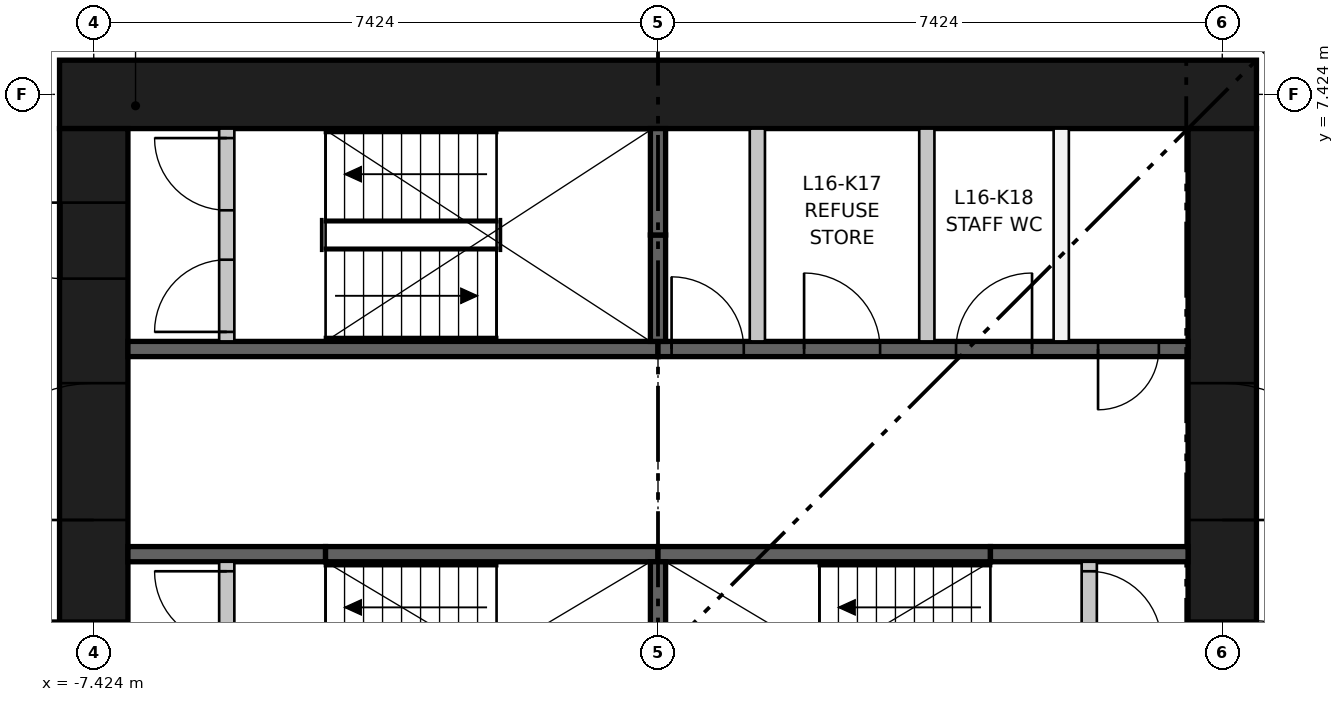
"""IFC4 building model, lengths in metres.
Left out: names, types, materials, properties, quantities, classifications, styles, units other than length and angle.
Written with IfcOpenShell. Run it as: python <this file> out.ifc"""

import sys

from ifc_helpers import new_model, si_unit, direction, frame, frame_2d, origin, place, context, subcontext, project, spatial, rectangle, extrude, element, fill, save


model = new_model("IFC4")
c1 = context("Model", 3, precision=1e-05, world=origin(), true_north=direction((0.0, 1.0)))
c2 = subcontext(c1, "Body", "Model", "MODEL_VIEW")
j1 = project(units=[si_unit("LENGTHUNIT", "METRE"), si_unit("PLANEANGLEUNIT", "RADIAN")], contexts=[c1])
p1 = place(None, origin())
s1 = spatial("IfcSite", under=j1, at=p1, CompositionType="ELEMENT")
p2 = place(p1, origin())
s2 = spatial("IfcBuilding", under=s1, at=p2, CompositionType="ELEMENT")
p3 = place(p2, frame((0.0, 0.0, 62.7)))
s3 = spatial("IfcBuildingStorey", under=s2, at=p3, CompositionType="ELEMENT", Elevation=62.7)
p4 = place(p3, frame((-7.874, 7.424, 0.0), z_axis=(0.0, 0.0, 1.0), x_axis=(1.0, 0.0, 0.0)))
e1 = element("IfcWall", 1, at=p4, inside=s3, PredefinedType="SHEAR", context=c2, shape_type="SweptSolid", body=[
    extrude(rectangle(XDim=15.748, YDim=0.9, at=frame_2d((7.874, 0.0))), origin(), (0.0, 0.0, 1.0), 3.65),
])
p5 = place(p3, frame((-7.424, -6.974, 0.0), z_axis=(0.0, 0.0, 1.0), x_axis=(0.0, 1.0, 0.0)))
e2 = element("IfcWall", 2, at=p5, inside=s3, PredefinedType="SHEAR", context=c2, shape_type="SweptSolid", body=[
    extrude(rectangle(XDim=13.948, YDim=0.9, at=frame_2d((6.974, 0.0))), origin(), (0.0, 0.0, 1.0), 3.65),
])
p6 = place(p5, frame((6.474, 0.0, 0.0)))
e3 = element("IfcOpeningElement", 3, at=p6, cuts=e2, PredefinedType="OPENING", context=c2, shape_type="SweptSolid", body=[
    extrude(rectangle(XDim=1.0, YDim=2.1, at=frame_2d((0.5, 1.05))), frame((0.0, 0.46, 0.0), z_axis=(0.0, -1.0, 0.0), x_axis=(1.0, 0.0, 0.0)), (0.0, 0.0, 1.0), 0.92),
])
p7 = place(p5, frame((3.35, 0.0, 0.0)))
e4 = element("IfcOpeningElement", 4, at=p7, cuts=e2, PredefinedType="OPENING", context=c2, shape_type="SweptSolid", body=[
    extrude(rectangle(XDim=1.8, YDim=2.1, at=frame_2d((0.9, 1.05))), frame((0.0, 0.46, 0.0), z_axis=(0.0, -1.0, 0.0), x_axis=(1.0, 0.0, 0.0)), (0.0, 0.0, 1.0), 0.92),
])
p8 = place(p5, frame((8.799, 0.0, 0.0)))
e5 = element("IfcOpeningElement", 5, at=p8, cuts=e2, PredefinedType="OPENING", context=c2, shape_type="SweptSolid", body=[
    extrude(rectangle(XDim=1.8, YDim=2.1, at=frame_2d((0.9, 1.05))), frame((0.0, 0.46, 0.0), z_axis=(0.0, -1.0, 0.0), x_axis=(1.0, 0.0, 0.0)), (0.0, 0.0, 1.0), 0.92),
])
p9 = place(p5, frame((11.974, 0.0, 0.0)))
e6 = element("IfcOpeningElement", 6, at=p9, cuts=e2, PredefinedType="OPENING", context=c2, shape_type="SweptSolid", body=[
    extrude(rectangle(XDim=1.0, YDim=2.1, at=frame_2d((0.5, 1.05))), frame((0.0, 0.46, 0.0), z_axis=(0.0, -1.0, 0.0), x_axis=(1.0, 0.0, 0.0)), (0.0, 0.0, 1.0), 0.92),
])
p10 = place(p3, frame((7.424, -6.974, 0.0), z_axis=(0.0, 0.0, 1.0), x_axis=(0.0, 1.0, 0.0)))
e7 = element("IfcWall", 7, at=p10, inside=s3, PredefinedType="SHEAR", context=c2, shape_type="SweptSolid", body=[
    extrude(rectangle(XDim=13.948, YDim=0.9, at=frame_2d((6.974, 0.0))), origin(), (0.0, 0.0, 1.0), 3.65),
])
p11 = place(p10, frame((6.474, 0.0, 0.0)))
e8 = element("IfcOpeningElement", 8, at=p11, cuts=e7, PredefinedType="OPENING", context=c2, shape_type="SweptSolid", body=[
    extrude(rectangle(XDim=1.0, YDim=2.1, at=frame_2d((0.5, 1.05))), frame((0.0, 0.46, 0.0), z_axis=(0.0, -1.0, 0.0), x_axis=(1.0, 0.0, 0.0)), (0.0, 0.0, 1.0), 0.92),
])
p12 = place(p10, frame((3.35, 0.0, 0.0)))
e9 = element("IfcOpeningElement", 9, at=p12, cuts=e7, PredefinedType="OPENING", context=c2, shape_type="SweptSolid", body=[
    extrude(rectangle(XDim=1.8, YDim=2.1, at=frame_2d((0.9, 1.05))), frame((0.0, 0.46, 0.0), z_axis=(0.0, -1.0, 0.0), x_axis=(1.0, 0.0, 0.0)), (0.0, 0.0, 1.0), 0.92),
])
p13 = place(p10, frame((8.799, 0.0, 0.0)))
e10 = element("IfcOpeningElement", 10, at=p13, cuts=e7, PredefinedType="OPENING", context=c2, shape_type="SweptSolid", body=[
    extrude(rectangle(XDim=1.8, YDim=2.1, at=frame_2d((0.9, 1.05))), frame((0.0, 0.46, 0.0), z_axis=(0.0, -1.0, 0.0), x_axis=(1.0, 0.0, 0.0)), (0.0, 0.0, 1.0), 0.92),
])
p14 = place(p3, frame((-6.974, 4.074, 0.0), z_axis=(0.0, 0.0, 1.0), x_axis=(1.0, 0.0, 0.0)))
e11 = element("IfcWall", 11, at=p14, inside=s3, PredefinedType="SHEAR", context=c2, shape_type="SweptSolid", body=[
    extrude(rectangle(XDim=6.974, YDim=0.2, at=frame_2d((3.487, 0.0))), origin(), (0.0, 0.0, 1.0), 3.3),
])
p15 = place(p3, frame((0.0, 4.074, 0.0), z_axis=(0.0, 0.0, 1.0), x_axis=(1.0, 0.0, 0.0)))
e12 = element("IfcWall", 12, at=p15, inside=s3, PredefinedType="SHEAR", context=c2, shape_type="SweptSolid", body=[
    extrude(rectangle(XDim=6.974, YDim=0.2, at=frame_2d((3.487, 0.0))), origin(), (0.0, 0.0, 1.0), 3.3),
])
p16 = place(p15, frame((0.179, 0.0, 0.0)))
e13 = element("IfcOpeningElement", 13, at=p16, cuts=e12, PredefinedType="OPENING", context=c2, shape_type="SweptSolid", body=[
    extrude(rectangle(XDim=0.95, YDim=2.1, at=frame_2d((0.475, 1.05))), frame((0.0, 0.11, 0.0), z_axis=(0.0, -1.0, 0.0), x_axis=(1.0, 0.0, 0.0)), (0.0, 0.0, 1.0), 0.22),
])
p17 = place(p15, frame((1.922, 0.0, 0.0)))
e14 = element("IfcOpeningElement", 14, at=p17, cuts=e12, PredefinedType="OPENING", context=c2, shape_type="SweptSolid", body=[
    extrude(rectangle(XDim=1.0, YDim=2.1, at=frame_2d((0.5, 1.05))), frame((0.0, 0.11, 0.0), z_axis=(0.0, -1.0, 0.0), x_axis=(1.0, 0.0, 0.0)), (0.0, 0.0, 1.0), 0.22),
])
p18 = place(p15, frame((3.921, 0.0, 0.0)))
e15 = element("IfcOpeningElement", 15, at=p18, cuts=e12, PredefinedType="OPENING", context=c2, shape_type="SweptSolid", body=[
    extrude(rectangle(XDim=1.0, YDim=2.1, at=frame_2d((0.5, 1.05))), frame((0.0, 0.11, 0.0), z_axis=(0.0, -1.0, 0.0), x_axis=(1.0, 0.0, 0.0)), (0.0, 0.0, 1.0), 0.22),
])
p19 = place(p15, frame((5.79, 0.0, 0.0)))
e16 = element("IfcOpeningElement", 16, at=p19, cuts=e12, PredefinedType="OPENING", context=c2, shape_type="SweptSolid", body=[
    extrude(rectangle(XDim=0.8, YDim=2.1, at=frame_2d((0.4, 1.05))), frame((0.0, 0.11, 0.0), z_axis=(0.0, -1.0, 0.0), x_axis=(1.0, 0.0, 0.0)), (0.0, 0.0, 1.0), 0.22),
])
p20 = place(p3, frame((-6.974, 1.375, 0.0), z_axis=(0.0, 0.0, 1.0), x_axis=(1.0, 0.0, 0.0)))
e17 = element("IfcWall", 17, at=p20, inside=s3, PredefinedType="SHEAR", context=c2, shape_type="SweptSolid", body=[
    extrude(rectangle(XDim=2.6, YDim=0.2, at=frame_2d((1.3, 0.0))), origin(), (0.0, 0.0, 1.0), 3.3),
])
for number, where, z_axis, x_axis in (
    (18, (-4.374, 1.375, 0.0), (0.0, 0.0, 1.0), (1.0, 0.0, 0.0)),
    (19, (0.0, 1.375, 0.0), (0.0, 0.0, 1.0), (1.0, 0.0, 0.0)),
):
    element("IfcWall", number, at=place(p3, frame(where, z_axis=z_axis, x_axis=x_axis)), inside=s3, PredefinedType="SHEAR", context=c2, shape_type="SweptSolid", body=[
        extrude(rectangle(XDim=4.374, YDim=0.2, at=frame_2d((2.187, 0.0))), origin(), (0.0, 0.0, 1.0), 3.3),
    ])
p21 = place(p3, frame((4.374, 1.375, 0.0), z_axis=(0.0, 0.0, 1.0), x_axis=(1.0, 0.0, 0.0)))
e20 = element("IfcWall", 20, at=p21, inside=s3, PredefinedType="SHEAR", context=c2, shape_type="SweptSolid", body=[
    extrude(rectangle(XDim=2.6, YDim=0.2, at=frame_2d((1.3, 0.0))), origin(), (0.0, 0.0, 1.0), 3.3),
])
p22 = place(p3, frame((0.0, -1.275, 0.0), z_axis=(0.0, 0.0, 1.0), x_axis=(0.0, 1.0, 0.0)))
e21 = element("IfcWall", 21, at=p22, inside=s3, PredefinedType="SHEAR", context=c2, shape_type="SweptSolid", body=[
    extrude(rectangle(XDim=2.55, YDim=0.2, at=frame_2d((1.275, 0.0))), origin(), (0.0, 0.0, 1.0), 3.3),
])
p23 = place(p3, frame((0.0, 4.174, 0.0), z_axis=(0.0, 0.0, 1.0), x_axis=(0.0, 1.0, 0.0)))
e22 = element("IfcWall", 22, at=p23, inside=s3, PredefinedType="SHEAR", context=c2, shape_type="SweptSolid", body=[
    extrude(rectangle(XDim=1.4, YDim=0.2, at=frame_2d((0.7, 0.0))), origin(), (0.0, 0.0, 1.0), 3.3),
])
p24 = place(p3, frame((0.0, 5.574, 0.0), z_axis=(0.0, 0.0, 1.0), x_axis=(0.0, 1.0, 0.0)))
e23 = element("IfcWall", 23, at=p24, inside=s3, PredefinedType="SHEAR", context=c2, shape_type="SweptSolid", body=[
    extrude(rectangle(XDim=1.4, YDim=0.2, at=frame_2d((0.7, 0.0))), origin(), (0.0, 0.0, 1.0), 3.3),
])
for number, where, z_axis, x_axis in (
    (24, (1.307, 4.174, 0.0), (0.0, 0.0, 1.0), (0.0, 1.0, 0.0)),
    (25, (3.537, 4.174, 0.0), (0.0, 0.0, 1.0), (0.0, 1.0, 0.0)),
    (26, (5.305, 4.174, 0.0), (0.0, 0.0, 1.0), (0.0, 1.0, 0.0)),
):
    element("IfcWall", number, at=place(p3, frame(where, z_axis=z_axis, x_axis=x_axis)), inside=s3, PredefinedType="PARTITIONING", context=c2, shape_type="SweptSolid", body=[
        extrude(rectangle(XDim=2.8, YDim=0.2, at=frame_2d((1.4, 0.0))), origin(), (0.0, 0.0, 1.0), 3.3),
    ])
p25 = place(p3, frame((-5.674, -1.275, 0.0), z_axis=(0.0, 0.0, 1.0), x_axis=(0.0, 1.0, 0.0)))
e27 = element("IfcWall", 27, at=p25, inside=s3, PredefinedType="PARTITIONING", context=c2, shape_type="SweptSolid", body=[
    extrude(rectangle(XDim=2.55, YDim=0.2, at=frame_2d((1.275, 0.0))), origin(), (0.0, 0.0, 1.0), 3.3),
])
p26 = place(p25, frame((0.125, 0.0, 0.0)))
e28 = element("IfcOpeningElement", 28, at=p26, cuts=e27, PredefinedType="OPENING", context=c2, shape_type="SweptSolid", body=[
    extrude(rectangle(XDim=0.95, YDim=2.1, at=frame_2d((0.475, 1.05))), frame((0.0, 0.11, 0.0), z_axis=(0.0, -1.0, 0.0), x_axis=(1.0, 0.0, 0.0)), (0.0, 0.0, 1.0), 0.22),
])
p27 = place(p25, frame((1.475, 0.0, 0.0)))
e29 = element("IfcOpeningElement", 29, at=p27, cuts=e27, PredefinedType="OPENING", context=c2, shape_type="SweptSolid", body=[
    extrude(rectangle(XDim=0.95, YDim=2.1, at=frame_2d((0.475, 1.05))), frame((0.0, 0.11, 0.0), z_axis=(0.0, -1.0, 0.0), x_axis=(1.0, 0.0, 0.0)), (0.0, 0.0, 1.0), 0.22),
])
p28 = place(p3, frame((5.674, -1.275, 0.0), z_axis=(0.0, 0.0, 1.0), x_axis=(0.0, 1.0, 0.0)))
e30 = element("IfcWall", 30, at=p28, inside=s3, PredefinedType="PARTITIONING", context=c2, shape_type="SweptSolid", body=[
    extrude(rectangle(XDim=2.55, YDim=0.2, at=frame_2d((1.275, 0.0))), origin(), (0.0, 0.0, 1.0), 3.3),
])
p29 = place(p28, frame((0.125, 0.0, 0.0)))
e31 = element("IfcOpeningElement", 31, at=p29, cuts=e30, PredefinedType="OPENING", context=c2, shape_type="SweptSolid", body=[
    extrude(rectangle(XDim=0.95, YDim=2.1, at=frame_2d((0.475, 1.05))), frame((0.0, 0.11, 0.0), z_axis=(0.0, -1.0, 0.0), x_axis=(1.0, 0.0, 0.0)), (0.0, 0.0, 1.0), 0.22),
])
p30 = place(p28, frame((1.475, 0.0, 0.0)))
e32 = element("IfcOpeningElement", 32, at=p30, cuts=e30, PredefinedType="OPENING", context=c2, shape_type="SweptSolid", body=[
    extrude(rectangle(XDim=0.95, YDim=2.1, at=frame_2d((0.475, 1.05))), frame((0.0, 0.11, 0.0), z_axis=(0.0, -1.0, 0.0), x_axis=(1.0, 0.0, 0.0)), (0.0, 0.0, 1.0), 0.22),
])
p31 = place(p3, frame((-5.674, 4.174, 0.0), z_axis=(0.0, 0.0, 1.0), x_axis=(0.0, 1.0, 0.0)))
e33 = element("IfcWall", 33, at=p31, inside=s3, PredefinedType="PARTITIONING", context=c2, shape_type="SweptSolid", body=[
    extrude(rectangle(XDim=2.8, YDim=0.2, at=frame_2d((1.4, 0.0))), origin(), (0.0, 0.0, 1.0), 3.3),
])
p32 = place(p31, frame((0.125, 0.0, 0.0)))
e34 = element("IfcOpeningElement", 34, at=p32, cuts=e33, PredefinedType="OPENING", context=c2, shape_type="SweptSolid", body=[
    extrude(rectangle(XDim=0.95, YDim=2.1, at=frame_2d((0.475, 1.05))), frame((0.0, 0.11, 0.0), z_axis=(0.0, -1.0, 0.0), x_axis=(1.0, 0.0, 0.0)), (0.0, 0.0, 1.0), 0.22),
])
p33 = place(p31, frame((1.725, 0.0, 0.0)))
e35 = element("IfcOpeningElement", 35, at=p33, cuts=e33, PredefinedType="OPENING", context=c2, shape_type="SweptSolid", body=[
    extrude(rectangle(XDim=0.95, YDim=2.1, at=frame_2d((0.475, 1.05))), frame((0.0, 0.11, 0.0), z_axis=(0.0, -1.0, 0.0), x_axis=(1.0, 0.0, 0.0)), (0.0, 0.0, 1.0), 0.22),
])
p34 = place(p27, origin())
e36 = element("IfcDoor", 36, at=p34, inside=s3, OperationType="SINGLE_SWING_RIGHT", PredefinedType="DOOR", context=c2, shape_type="SweptSolid", body=[
    extrude(rectangle(XDim=0.95, YDim=2.1, at=frame_2d((0.475, 1.05))), frame((0.0, 0.025, 0.0), z_axis=(0.0, -1.0, 0.0), x_axis=(1.0, 0.0, 0.0)), (0.0, 0.0, 1.0), 0.05),
])
fill(e29, e36)
p35 = place(p30, frame((0.95, 0.0, 0.0), z_axis=(0.0, 0.0, 1.0), x_axis=(-1.0, 0.0, 0.0)))
e37 = element("IfcDoor", 37, at=p35, inside=s3, OperationType="SINGLE_SWING_LEFT", PredefinedType="DOOR", context=c2, shape_type="SweptSolid", body=[
    extrude(rectangle(XDim=0.95, YDim=2.1, at=frame_2d((0.475, 1.05))), frame((0.0, 0.025, 0.0), z_axis=(0.0, -1.0, 0.0), x_axis=(1.0, 0.0, 0.0)), (0.0, 0.0, 1.0), 0.05),
])
fill(e32, e37)
p36 = place(p32, origin())
e38 = element("IfcDoor", 38, at=p36, inside=s3, OperationType="SINGLE_SWING_LEFT", PredefinedType="DOOR", context=c2, shape_type="SweptSolid", body=[
    extrude(rectangle(XDim=0.95, YDim=2.1, at=frame_2d((0.475, 1.05))), frame((0.0, 0.025, 0.0), z_axis=(0.0, -1.0, 0.0), x_axis=(1.0, 0.0, 0.0)), (0.0, 0.0, 1.0), 0.05),
])
fill(e34, e38)
p37 = place(p33, origin())
e39 = element("IfcDoor", 39, at=p37, inside=s3, OperationType="SINGLE_SWING_RIGHT", PredefinedType="DOOR", context=c2, shape_type="SweptSolid", body=[
    extrude(rectangle(XDim=0.95, YDim=2.1, at=frame_2d((0.475, 1.05))), frame((0.0, 0.025, 0.0), z_axis=(0.0, -1.0, 0.0), x_axis=(1.0, 0.0, 0.0)), (0.0, 0.0, 1.0), 0.05),
])
fill(e35, e39)
p38 = place(p16, origin())
e40 = element("IfcDoor", 40, at=p38, inside=s3, OperationType="SINGLE_SWING_LEFT", PredefinedType="DOOR", context=c2, shape_type="SweptSolid", body=[
    extrude(rectangle(XDim=0.95, YDim=2.1, at=frame_2d((0.475, 1.05))), frame((0.0, 0.025, 0.0), z_axis=(0.0, -1.0, 0.0), x_axis=(1.0, 0.0, 0.0)), (0.0, 0.0, 1.0), 0.05),
])
fill(e13, e40)
p39 = place(p17, origin())
e41 = element("IfcDoor", 41, at=p39, inside=s3, OperationType="SINGLE_SWING_LEFT", PredefinedType="DOOR", context=c2, shape_type="SweptSolid", body=[
    extrude(rectangle(XDim=1.0, YDim=2.1, at=frame_2d((0.5, 1.05))), frame((0.0, 0.025, 0.0), z_axis=(0.0, -1.0, 0.0), x_axis=(1.0, 0.0, 0.0)), (0.0, 0.0, 1.0), 0.05),
])
fill(e14, e41)
p40 = place(p18, origin())
e42 = element("IfcDoor", 42, at=p40, inside=s3, OperationType="SINGLE_SWING_RIGHT", PredefinedType="DOOR", context=c2, shape_type="SweptSolid", body=[
    extrude(rectangle(XDim=1.0, YDim=2.1, at=frame_2d((0.5, 1.05))), frame((0.0, 0.025, 0.0), z_axis=(0.0, -1.0, 0.0), x_axis=(1.0, 0.0, 0.0)), (0.0, 0.0, 1.0), 0.05),
])
fill(e15, e42)
p41 = place(p19, frame((0.8, 0.0, 0.0), z_axis=(0.0, 0.0, 1.0), x_axis=(-1.0, 0.0, 0.0)))
e43 = element("IfcDoor", 43, at=p41, inside=s3, OperationType="SINGLE_SWING_LEFT", PredefinedType="DOOR", context=c2, shape_type="SweptSolid", body=[
    extrude(rectangle(XDim=0.8, YDim=2.1, at=frame_2d((0.4, 1.05))), frame((0.0, 0.025, 0.0), z_axis=(0.0, -1.0, 0.0), x_axis=(1.0, 0.0, 0.0)), (0.0, 0.0, 1.0), 0.05),
])
fill(e16, e43)
p42 = place(p6, origin())
e44 = element("IfcDoor", 44, at=p42, inside=s3, OperationType="SINGLE_SWING_RIGHT", PredefinedType="DOOR", context=c2, shape_type="SweptSolid", body=[
    extrude(rectangle(XDim=1.0, YDim=2.1, at=frame_2d((0.5, 1.05))), frame((0.0, 0.45, 0.0), z_axis=(0.0, -1.0, 0.0), x_axis=(1.0, 0.0, 0.0)), (0.0, 0.0, 1.0), 0.05),
])
fill(e3, e44)
p43 = place(p8, origin())
e45 = element("IfcDoor", 45, at=p43, inside=s3, OperationType="DOUBLE_DOOR_SINGLE_SWING", PredefinedType="DOOR", context=c2, shape_type="SweptSolid", body=[
    extrude(rectangle(XDim=1.8, YDim=2.1, at=frame_2d((0.9, 1.05))), frame((0.0, 0.025, 0.0), z_axis=(0.0, -1.0, 0.0), x_axis=(1.0, 0.0, 0.0)), (0.0, 0.0, 1.0), 0.05),
])
fill(e5, e45)
p44 = place(p9, origin())
e46 = element("IfcDoor", 46, at=p44, inside=s3, OperationType="SINGLE_SWING_RIGHT", PredefinedType="DOOR", context=c2, shape_type="SweptSolid", body=[
    extrude(rectangle(XDim=1.0, YDim=2.1, at=frame_2d((0.5, 1.05))), frame((0.0, 0.45, 0.0), z_axis=(0.0, -1.0, 0.0), x_axis=(1.0, 0.0, 0.0)), (0.0, 0.0, 1.0), 0.05),
])
fill(e6, e46)
p45 = place(p11, frame((1.0, 0.0, 0.0), z_axis=(0.0, 0.0, 1.0), x_axis=(-1.0, 0.0, 0.0)))
e47 = element("IfcDoor", 47, at=p45, inside=s3, OperationType="SINGLE_SWING_LEFT", PredefinedType="DOOR", context=c2, shape_type="SweptSolid", body=[
    extrude(rectangle(XDim=1.0, YDim=2.1, at=frame_2d((0.5, 1.05))), frame((0.0, 0.45, 0.0), z_axis=(0.0, -1.0, 0.0), x_axis=(1.0, 0.0, 0.0)), (0.0, 0.0, 1.0), 0.05),
])
fill(e8, e47)
p46 = place(p13, frame((1.8, 0.0, 0.0), z_axis=(0.0, 0.0, 1.0), x_axis=(-1.0, 0.0, 0.0)))
e48 = element("IfcDoor", 48, at=p46, inside=s3, OperationType="DOUBLE_DOOR_SINGLE_SWING", PredefinedType="DOOR", context=c2, shape_type="SweptSolid", body=[
    extrude(rectangle(XDim=1.8, YDim=2.1, at=frame_2d((0.9, 1.05))), frame((0.0, 0.025, 0.0), z_axis=(0.0, -1.0, 0.0), x_axis=(1.0, 0.0, 0.0)), (0.0, 0.0, 1.0), 0.05),
])
fill(e10, e48)
save(model, sys.argv[1])
